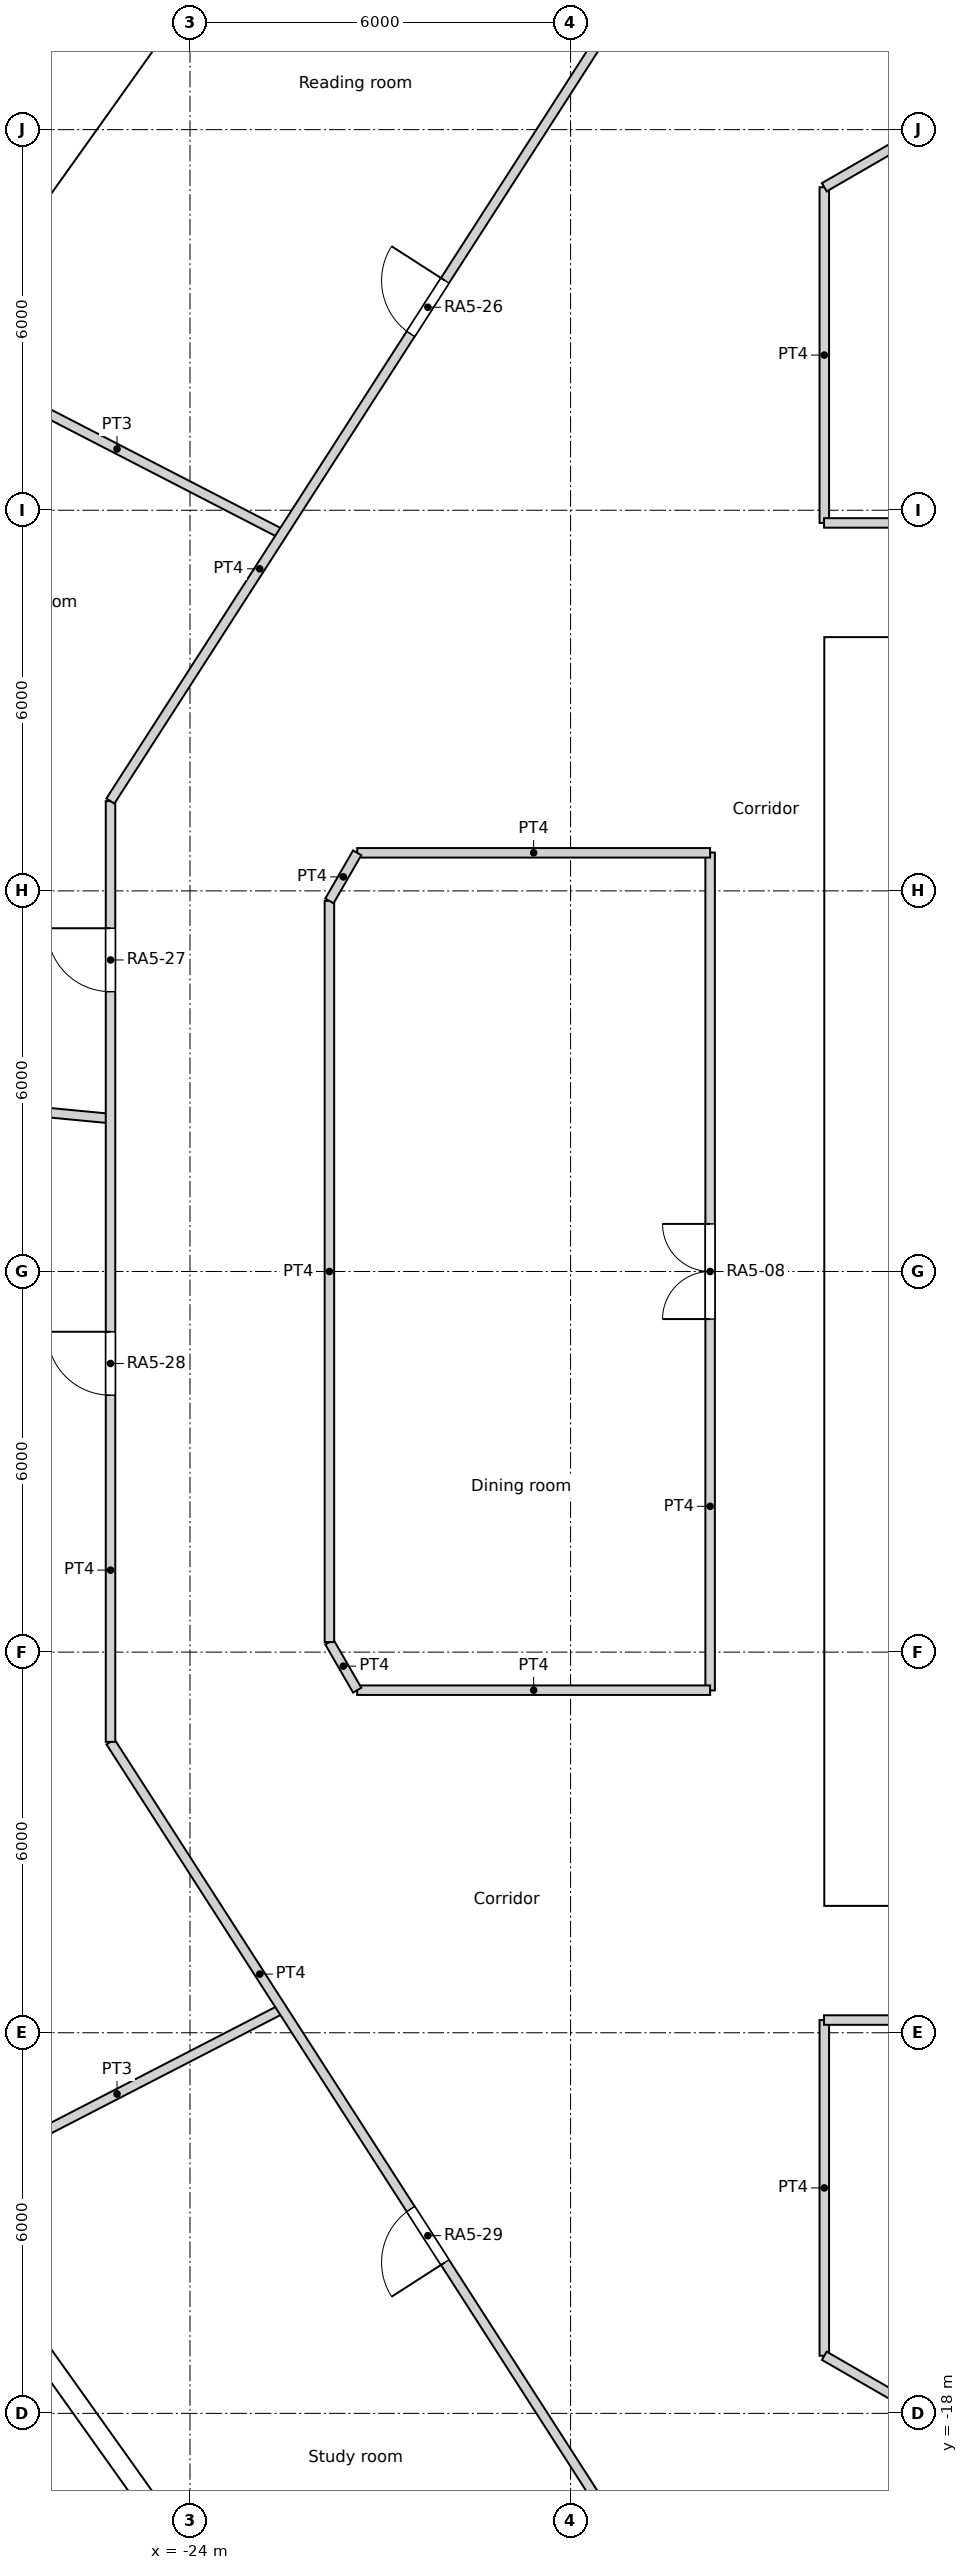
"""IFC4 building model, lengths in metres.
Left out: names, types, materials, properties, quantities, classifications, styles, units other than length and angle.
Written with IfcOpenShell. Run it as: python <this file> out.ifc"""

import sys

from ifc_helpers import new_model, si_unit, direction, frame, frame_2d, origin, origin_2d, place, context, subcontext, project, spatial, rectangle, circle, extrude, element, fill, save


model = new_model("IFC4")
c1 = context("Model", 3, precision=1e-05, world=origin(), true_north=direction((0.0, 1.0)))
c2 = subcontext(c1, "Body", "Model", "MODEL_VIEW")
j1 = project(units=[si_unit("LENGTHUNIT", "METRE"), si_unit("PLANEANGLEUNIT", "RADIAN")], contexts=[c1])
p1 = place(None, origin())
s1 = spatial("IfcSite", under=j1, at=p1, CompositionType="ELEMENT")
p2 = place(p1, origin())
s2 = spatial("IfcBuilding", under=s1, at=p2, CompositionType="ELEMENT")
p3 = place(p2, frame((0.0, 0.0, 71.4)))
s3 = spatial("IfcBuildingStorey", under=s2, at=p3, CompositionType="ELEMENT", Elevation=71.4)
for number, where, z_axis, x_axis in (
    (1, (-23.797, 18.715, 0.0), (0.0, 0.0, 1.0), (1.0, 0.0, 0.0)),
    (2, (-23.797, -18.715, 0.0), (0.0, 0.0, 1.0), (1.0, 0.0, 0.0)),
):
    element("IfcColumn", number, at=place(p3, frame(where, z_axis=z_axis, x_axis=x_axis)), inside=s3, PredefinedType="COLUMN", context=c2, shape_type="SweptSolid", body=[
        extrude(circle(Radius=0.6, at=origin_2d()), origin(), (0.0, 0.0, 1.0), 3.6),
    ])
for number, where, z_axis, x_axis in (
    (3, (-16.846, 17.855, 0.0), (0.0, 0.0, 1.0), (1.0, 0.0, 0.0)),
    (4, (-20.509, 13.489, 0.0), (0.0, 0.0, 1.0), (1.0, 0.0, 0.0)),
    (5, (-23.067, 8.396, 0.0), (0.0, 0.0, 1.0), (1.0, 0.0, 0.0)),
    (6, (-24.382, 2.85, 0.0), (0.0, 0.0, 1.0), (1.0, 0.0, 0.0)),
    (7, (-24.382, -2.85, 0.0), (0.0, 0.0, 1.0), (1.0, 0.0, 0.0)),
    (8, (-23.067, -8.396, 0.0), (0.0, 0.0, 1.0), (1.0, 0.0, 0.0)),
    (9, (-20.509, -13.489, 0.0), (0.0, 0.0, 1.0), (1.0, 0.0, 0.0)),
    (10, (-16.846, -17.855, 0.0), (0.0, 0.0, 1.0), (1.0, 0.0, 0.0)),
):
    element("IfcColumn", number, at=place(p3, frame(where, z_axis=z_axis, x_axis=x_axis)), inside=s3, PredefinedType="COLUMN", context=c2, shape_type="SweptSolid", body=[
        extrude(circle(Radius=0.65, at=origin_2d()), origin(), (0.0, 0.0, 1.0), 3.6),
    ])
for number, where, z_axis, x_axis in (
    (11, (-13.798, 12.802, 0.0), (0.0, 0.0, 1.0), (1.0, 0.0, 0.0)),
    (12, (-16.958, 8.167, 0.0), (0.0, 0.0, 1.0), (1.0, 0.0, 0.0)),
    (13, (-18.612, 2.805, 0.0), (0.0, 0.0, 1.0), (1.0, 0.0, 0.0)),
    (14, (-18.612, -2.805, 0.0), (0.0, 0.0, 1.0), (1.0, 0.0, 0.0)),
    (15, (-16.958, -8.167, 0.0), (0.0, 0.0, 1.0), (1.0, 0.0, 0.0)),
    (16, (-13.798, -12.802, 0.0), (0.0, 0.0, 1.0), (1.0, 0.0, 0.0)),
):
    element("IfcColumn", number, at=place(p3, frame(where, z_axis=z_axis, x_axis=x_axis)), inside=s3, PredefinedType="COLUMN", context=c2, shape_type="SweptSolid", body=[
        extrude(circle(Radius=0.7, at=origin_2d()), origin(), (0.0, 0.0, 1.0), 3.6),
    ])
p4 = place(p3, frame((-25.126, 19.734, -0.45), z_axis=(0.0, 0.0, 1.0), x_axis=(-0.580090570606, -0.814551981088, 0.0)))
e17 = element("IfcWall", 17, at=p4, inside=s3, PredefinedType="ELEMENTEDWALL", context=c2, shape_type="SweptSolid", body=[
    extrude(rectangle(XDim=3.0, YDim=1.45, at=frame_2d((1.5, 0.0))), origin(), (0.0, 0.0, 1.0), 3.6),
])
p5 = place(p4, frame((1.5, 0.0, 2.0)))
e18 = element("IfcOpeningElement", 18, at=p5, cuts=e17, PredefinedType="OPENING", context=c2, shape_type="SweptSolid", body=[
    extrude(circle(Radius=0.9, at=origin_2d()), frame((0.0, 0.735, 0.0), z_axis=(0.0, -1.0, 0.0), x_axis=(1.0, 0.0, 0.0)), (0.0, 0.0, 1.0), 1.47),
])
p6 = place(p3, frame((-26.39, -16.967, 0.0), z_axis=(0.0, 0.0, 1.0), x_axis=(0.580113774115, -0.814535456, 0.0)))
e19 = element("IfcWall", 19, at=p6, inside=s3, PredefinedType="SOLIDWALL", context=c2, shape_type="SweptSolid", body=[
    extrude(rectangle(XDim=2.98, YDim=0.3, at=frame_2d((1.49, 0.0))), origin(), (0.0, 0.0, 1.0), 3.15),
])
p7 = place(p6, frame((1.49, 0.0, 1.55)))
e20 = element("IfcOpeningElement", 20, at=p7, cuts=e19, PredefinedType="OPENING", context=c2, shape_type="SweptSolid", body=[
    extrude(circle(Radius=0.9, at=origin_2d()), frame((0.0, 0.16, 0.0), z_axis=(0.0, -1.0, 0.0), x_axis=(1.0, 0.0, 0.0)), (0.0, 0.0, 1.0), 0.32),
])
p8 = place(p3, frame((-14.0, -9.4, 0.0), z_axis=(0.0, 0.0, 1.0), x_axis=(1.0, 0.0, 0.0)))
e21 = element("IfcWall", 21, at=p8, inside=s3, PredefinedType="SOLIDWALL", context=c2, shape_type="SweptSolid", body=[
    extrude(rectangle(XDim=28.0, YDim=1.2, at=frame_2d((14.0, 0.0))), origin(), (0.0, 0.0, 1.0), 3.6),
])
p9 = place(p8, frame((14.9, 0.0, 0.0)))
e22 = element("IfcOpeningElement", 22, at=p9, cuts=e21, PredefinedType="OPENING", context=c2, shape_type="SweptSolid", body=[
    extrude(rectangle(XDim=1.0, YDim=2.1, at=frame_2d((0.5, 1.05))), frame((0.0, 0.6, 0.0), z_axis=(0.0, -1.0, 0.0), x_axis=(1.0, 0.0, 0.0)), (0.0, 0.0, 1.0), 1.2),
])
p10 = place(p8, frame((9.8, 0.0, 0.0)))
e23 = element("IfcOpeningElement", 23, at=p10, cuts=e21, PredefinedType="OPENING", context=c2, shape_type="SweptSolid", body=[
    extrude(rectangle(XDim=1.8, YDim=2.1, at=frame_2d((0.9, 1.05))), frame((0.0, 0.6, 0.0), z_axis=(0.0, -1.0, 0.0), x_axis=(1.0, 0.0, 0.0)), (0.0, 0.0, 1.0), 1.2),
])
p11 = place(p8, frame((16.4, 0.0, 0.0)))
e24 = element("IfcOpeningElement", 24, at=p11, cuts=e21, PredefinedType="OPENING", context=c2, shape_type="SweptSolid", body=[
    extrude(rectangle(XDim=1.8, YDim=2.1, at=frame_2d((0.9, 1.05))), frame((0.0, 0.6, 0.0), z_axis=(0.0, -1.0, 0.0), x_axis=(1.0, 0.0, 0.0)), (0.0, 0.0, 1.0), 1.2),
])
p12 = place(p3, frame((-14.0, 9.4, 0.0), z_axis=(0.0, 0.0, 1.0), x_axis=(1.0, 0.0, 0.0)))
e25 = element("IfcWall", 25, at=p12, inside=s3, PredefinedType="SOLIDWALL", context=c2, shape_type="SweptSolid", body=[
    extrude(rectangle(XDim=28.0, YDim=1.2, at=frame_2d((14.0, 0.0))), origin(), (0.0, 0.0, 1.0), 3.6),
])
p13 = place(p12, frame((9.8, 0.0, 0.0)))
e26 = element("IfcOpeningElement", 26, at=p13, cuts=e25, PredefinedType="OPENING", context=c2, shape_type="SweptSolid", body=[
    extrude(rectangle(XDim=1.8, YDim=2.1, at=frame_2d((0.9, 1.05))), frame((0.0, 0.6, 0.0), z_axis=(0.0, -1.0, 0.0), x_axis=(1.0, 0.0, 0.0)), (0.0, 0.0, 1.0), 1.2),
])
p14 = place(p3, frame((-13.4, -8.8, 0.0), z_axis=(0.0, 0.0, 1.0), x_axis=(0.0, 1.0, 0.0)))
e27 = element("IfcWall", 27, at=p14, inside=s3, PredefinedType="SOLIDWALL", context=c2, shape_type="SweptSolid", body=[
    extrude(rectangle(XDim=17.6, YDim=1.2, at=frame_2d((8.8, 0.0))), origin(), (0.0, 0.0, 1.0), 3.6),
])
p15 = place(p14, frame((5.2, 0.0, 0.0)))
e28 = element("IfcOpeningElement", 28, at=p15, cuts=e27, PredefinedType="OPENING", context=c2, shape_type="SweptSolid", body=[
    extrude(rectangle(XDim=1.0, YDim=2.1, at=frame_2d((0.5, 1.05))), frame((0.0, 0.6, 0.0), z_axis=(0.0, -1.0, 0.0), x_axis=(1.0, 0.0, 0.0)), (0.0, 0.0, 1.0), 1.2),
])
p16 = place(p14, frame((11.4, 0.0, 0.0)))
e29 = element("IfcOpeningElement", 29, at=p16, cuts=e27, PredefinedType="OPENING", context=c2, shape_type="SweptSolid", body=[
    extrude(rectangle(XDim=1.0, YDim=2.1, at=frame_2d((0.5, 1.05))), frame((0.0, 0.6, 0.0), z_axis=(0.0, -1.0, 0.0), x_axis=(1.0, 0.0, 0.0)), (0.0, 0.0, 1.0), 1.2),
])
p17 = place(p3, frame((-14.004, 11.8, 0.0), z_axis=(0.0, 0.0, 1.0), x_axis=(1.0, 0.0, 0.0)))
e30 = element("IfcWall", 30, at=p17, inside=s3, PredefinedType="PARTITIONING", context=c2, shape_type="SweptSolid", body=[
    extrude(rectangle(XDim=12.816, YDim=0.15, at=frame_2d((6.408, 0.0))), origin(), (0.0, 0.0, 1.0), 3.15),
])
p18 = place(p17, frame((5.908, 0.0, 0.0)))
e31 = element("IfcOpeningElement", 31, at=p18, cuts=e30, PredefinedType="OPENING", context=c2, shape_type="SweptSolid", body=[
    extrude(rectangle(XDim=1.0, YDim=2.04, at=frame_2d((0.5, 1.02))), frame((0.0, 0.075, 0.0), z_axis=(0.0, -1.0, 0.0), x_axis=(1.0, 0.0, 0.0)), (0.0, 0.0, 1.0), 0.15),
])
p19 = place(p3, frame((-14.004, -11.8, 0.0), z_axis=(0.0, 0.0, 1.0), x_axis=(1.0, 0.0, 0.0)))
e32 = element("IfcWall", 32, at=p19, inside=s3, PredefinedType="PARTITIONING", context=c2, shape_type="SweptSolid", body=[
    extrude(rectangle(XDim=12.816, YDim=0.15, at=frame_2d((6.408, 0.0))), origin(), (0.0, 0.0, 1.0), 3.15),
])
p20 = place(p19, frame((5.908, 0.0, 0.0)))
e33 = element("IfcOpeningElement", 33, at=p20, cuts=e32, PredefinedType="OPENING", context=c2, shape_type="SweptSolid", body=[
    extrude(rectangle(XDim=1.0, YDim=2.04, at=frame_2d((0.5, 1.02))), frame((0.0, 0.075, 0.0), z_axis=(0.0, -1.0, 0.0), x_axis=(1.0, 0.0, 0.0)), (0.0, 0.0, 1.0), 0.15),
])
p21 = place(p3, frame((-15.8, -6.604, 0.0), z_axis=(0.0, 0.0, 1.0), x_axis=(0.0, 1.0, 0.0)))
e34 = element("IfcWall", 34, at=p21, inside=s3, PredefinedType="PARTITIONING", context=c2, shape_type="SweptSolid", body=[
    extrude(rectangle(XDim=13.208, YDim=0.15, at=frame_2d((6.604, 0.0))), origin(), (0.0, 0.0, 1.0), 3.15),
])
p22 = place(p21, frame((5.854, 0.0, 0.0)))
e35 = element("IfcOpeningElement", 35, at=p22, cuts=e34, PredefinedType="OPENING", context=c2, shape_type="SweptSolid", body=[
    extrude(rectangle(XDim=1.5, YDim=2.1, at=frame_2d((0.75, 1.05))), frame((0.0, 0.075, 0.0), z_axis=(0.0, -1.0, 0.0), x_axis=(1.0, 0.0, 0.0)), (0.0, 0.0, 1.0), 0.15),
])
p23 = place(p3, frame((-14.0, 17.092, 0.0), z_axis=(0.0, 0.0, 1.0), x_axis=(0.86602719091, 0.499996904595, 0.0)))
e36 = element("IfcWall", 36, at=p23, inside=s3, PredefinedType="PARTITIONING", context=c2, shape_type="SweptSolid", body=[
    extrude(rectangle(XDim=9.42, YDim=0.15, at=frame_2d((4.71, 0.0))), origin(), (0.0, 0.0, 1.0), 3.15),
])
p24 = place(p3, frame((-14.0, 11.8, 0.0), z_axis=(0.0, 0.0, 1.0), x_axis=(0.0, 1.0, 0.0)))
e37 = element("IfcWall", 37, at=p24, inside=s3, PredefinedType="PARTITIONING", context=c2, shape_type="SweptSolid", body=[
    extrude(rectangle(XDim=5.292, YDim=0.15, at=frame_2d((2.646, 0.0))), origin(), (0.0, 0.0, 1.0), 3.15),
])
p25 = place(p3, frame((-25.255, 7.416, 0.0), z_axis=(0.0, 0.0, 1.0), x_axis=(0.540805851332, 0.841147449123, 0.0)))
e38 = element("IfcWall", 38, at=p25, inside=s3, PredefinedType="PARTITIONING", context=c2, shape_type="SweptSolid", body=[
    extrude(rectangle(XDim=14.829, YDim=0.15, at=frame_2d((7.415, 0.0))), origin(), (0.0, 0.0, 1.0), 3.15),
])
p26 = place(p25, frame((8.754, 0.0, 0.0)))
e39 = element("IfcOpeningElement", 39, at=p26, cuts=e38, PredefinedType="OPENING", context=c2, shape_type="SweptSolid", body=[
    extrude(rectangle(XDim=1.0, YDim=2.04, at=frame_2d((0.5, 1.02))), frame((0.0, 0.075, 0.0), z_axis=(0.0, -1.0, 0.0), x_axis=(1.0, 0.0, 0.0)), (0.0, 0.0, 1.0), 0.15),
])
p27 = place(p3, frame((-14.0, -17.092, 0.0), z_axis=(0.0, 0.0, 1.0), x_axis=(0.0, 1.0, 0.0)))
e40 = element("IfcWall", 40, at=p27, inside=s3, PredefinedType="PARTITIONING", context=c2, shape_type="SweptSolid", body=[
    extrude(rectangle(XDim=5.292, YDim=0.15, at=frame_2d((2.646, 0.0))), origin(), (0.0, 0.0, 1.0), 3.15),
])
p28 = place(p3, frame((-21.364, 6.6, 0.0), z_axis=(0.0, 0.0, 1.0), x_axis=(1.0, 0.0, 0.0)))
e41 = element("IfcWall", 41, at=p28, inside=s3, PredefinedType="PARTITIONING", context=c2, shape_type="SweptSolid", body=[
    extrude(rectangle(XDim=5.564, YDim=0.15, at=frame_2d((2.782, 0.0))), origin(), (0.0, 0.0, 1.0), 3.15),
])
p29 = place(p3, frame((-21.802, 5.842, 0.0), z_axis=(0.0, 0.0, 1.0), x_axis=(0.500277597875, 0.865865073245, 0.0)))
e42 = element("IfcWall", 42, at=p29, inside=s3, PredefinedType="PARTITIONING", context=c2, shape_type="SweptSolid", body=[
    extrude(rectangle(XDim=0.875, YDim=0.15, at=frame_2d((0.438, 0.0))), origin(), (0.0, 0.0, 1.0), 3.15),
])
p30 = place(p3, frame((-21.802, -5.842, 0.0), z_axis=(0.0, 0.0, 1.0), x_axis=(0.0, 1.0, 0.0)))
e43 = element("IfcWall", 43, at=p30, inside=s3, PredefinedType="PARTITIONING", context=c2, shape_type="SweptSolid", body=[
    extrude(rectangle(XDim=11.684, YDim=0.15, at=frame_2d((5.842, 0.0))), origin(), (0.0, 0.0, 1.0), 3.15),
])
p31 = place(p3, frame((-21.802, -5.842, 0.0), z_axis=(0.0, 0.0, 1.0), x_axis=(0.500277597875, -0.865865073245, 0.0)))
e44 = element("IfcWall", 44, at=p31, inside=s3, PredefinedType="PARTITIONING", context=c2, shape_type="SweptSolid", body=[
    extrude(rectangle(XDim=0.875, YDim=0.15, at=frame_2d((0.438, 0.0))), origin(), (0.0, 0.0, 1.0), 3.15),
])
p32 = place(p3, frame((-21.364, -6.6, 0.0), z_axis=(0.0, 0.0, 1.0), x_axis=(1.0, 0.0, 0.0)))
e45 = element("IfcWall", 45, at=p32, inside=s3, PredefinedType="PARTITIONING", context=c2, shape_type="SweptSolid", body=[
    extrude(rectangle(XDim=5.564, YDim=0.15, at=frame_2d((2.782, 0.0))), origin(), (0.0, 0.0, 1.0), 3.15),
])
p33 = place(p3, frame((-25.253, -7.415, 0.0), z_axis=(0.0, 0.0, 1.0), x_axis=(0.0, 1.0, 0.0)))
e46 = element("IfcWall", 46, at=p33, inside=s3, PredefinedType="PARTITIONING", context=c2, shape_type="SweptSolid", body=[
    extrude(rectangle(XDim=14.83, YDim=0.15, at=frame_2d((7.415, 0.0))), origin(), (0.0, 0.0, 1.0), 3.15),
])
p34 = place(p33, frame((11.826, 0.0, 0.0)))
e47 = element("IfcOpeningElement", 47, at=p34, cuts=e46, PredefinedType="OPENING", context=c2, shape_type="SweptSolid", body=[
    extrude(rectangle(XDim=1.0, YDim=2.04, at=frame_2d((0.5, 1.02))), frame((0.0, 0.075, 0.0), z_axis=(0.0, -1.0, 0.0), x_axis=(1.0, 0.0, 0.0)), (0.0, 0.0, 1.0), 0.15),
])
p35 = place(p33, frame((5.465, 0.0, 0.0)))
e48 = element("IfcOpeningElement", 48, at=p35, cuts=e46, PredefinedType="OPENING", context=c2, shape_type="SweptSolid", body=[
    extrude(rectangle(XDim=1.0, YDim=2.04, at=frame_2d((0.5, 1.02))), frame((0.0, 0.075, 0.0), z_axis=(0.0, -1.0, 0.0), x_axis=(1.0, 0.0, 0.0)), (0.0, 0.0, 1.0), 0.15),
])
p36 = place(p3, frame((-25.253, -7.415, 0.0), z_axis=(0.0, 0.0, 1.0), x_axis=(0.540656073354, -0.841243728265, 0.0)))
e49 = element("IfcWall", 49, at=p36, inside=s3, PredefinedType="PARTITIONING", context=c2, shape_type="SweptSolid", body=[
    extrude(rectangle(XDim=14.829, YDim=0.15, at=frame_2d((7.415, 0.0))), origin(), (0.0, 0.0, 1.0), 3.15),
])
p37 = place(p36, frame((8.753, 0.0, 0.0)))
e50 = element("IfcOpeningElement", 50, at=p37, cuts=e49, PredefinedType="OPENING", context=c2, shape_type="SweptSolid", body=[
    extrude(rectangle(XDim=1.0, YDim=2.04, at=frame_2d((0.5, 1.02))), frame((0.0, 0.075, 0.0), z_axis=(0.0, -1.0, 0.0), x_axis=(1.0, 0.0, 0.0)), (0.0, 0.0, 1.0), 0.15),
])
p38 = place(p3, frame((-14.0, -17.092, 0.0), z_axis=(0.0, 0.0, 1.0), x_axis=(0.86602719091, -0.499996904595, 0.0)))
e51 = element("IfcWall", 51, at=p38, inside=s3, PredefinedType="PARTITIONING", context=c2, shape_type="SweptSolid", body=[
    extrude(rectangle(XDim=9.42, YDim=0.15, at=frame_2d((4.71, 0.0))), origin(), (0.0, 0.0, 1.0), 3.15),
])
p39 = place(p3, frame((-27.753, 14.308, 0.0), z_axis=(0.0, 0.0, 1.0), x_axis=(0.88877955153, -0.45833493079, 0.0)))
e52 = element("IfcWall", 52, at=p39, inside=s3, PredefinedType="PARTITIONING", context=c2, shape_type="SweptSolid", body=[
    extrude(rectangle(XDim=5.856, YDim=0.15, at=frame_2d((2.928, 0.0))), origin(), (0.0, 0.0, 1.0), 3.15),
])
p40 = place(p3, frame((-31.083, 2.968, 0.0), z_axis=(0.0, 0.0, 1.0), x_axis=(0.995465070325, -0.095127775983, 0.0)))
e53 = element("IfcWall", 53, at=p40, inside=s3, PredefinedType="PARTITIONING", context=c2, shape_type="SweptSolid", body=[
    extrude(rectangle(XDim=5.857, YDim=0.15, at=frame_2d((2.928, 0.0))), origin(), (0.0, 0.0, 1.0), 3.15),
])
p41 = place(p3, frame((-27.753, -14.308, 0.0), z_axis=(0.0, 0.0, 1.0), x_axis=(0.88877955153, 0.45833493079, 0.0)))
e54 = element("IfcWall", 54, at=p41, inside=s3, PredefinedType="PARTITIONING", context=c2, shape_type="SweptSolid", body=[
    extrude(rectangle(XDim=5.856, YDim=0.15, at=frame_2d((2.928, 0.0))), origin(), (0.0, 0.0, 1.0), 3.15),
])
p42 = place(p5, origin())
e55 = element("IfcWindow", 55, at=p42, inside=s3, PartitioningType="SINGLE_PANEL", PredefinedType="WINDOW", context=c2, shape_type="SweptSolid", body=[
    extrude(circle(Radius=0.9, at=origin_2d()), frame((0.0, 0.695, 0.0), z_axis=(0.0, -1.0, 0.0), x_axis=(1.0, 0.0, 0.0)), (0.0, 0.0, 1.0), 0.1),
])
fill(e18, e55)
p43 = place(p7, origin())
e56 = element("IfcWindow", 56, at=p43, inside=s3, PartitioningType="SINGLE_PANEL", PredefinedType="WINDOW", context=c2, shape_type="SweptSolid", body=[
    extrude(circle(Radius=0.9, at=origin_2d()), frame((0.0, 0.12, 0.0), z_axis=(0.0, -1.0, 0.0), x_axis=(1.0, 0.0, 0.0)), (0.0, 0.0, 1.0), 0.1),
])
fill(e20, e56)
p44 = place(p15, origin())
e57 = element("IfcDoor", 57, at=p44, inside=s3, OperationType="DOUBLE_DOOR_SINGLE_SWING", PredefinedType="DOOR", context=c2, shape_type="SweptSolid", body=[
    extrude(rectangle(XDim=1.0, YDim=2.1, at=frame_2d((0.5, 1.05))), frame((0.0, 0.025, 0.0), z_axis=(0.0, -1.0, 0.0), x_axis=(1.0, 0.0, 0.0)), (0.0, 0.0, 1.0), 0.05),
])
fill(e28, e57)
p45 = place(p16, origin())
e58 = element("IfcDoor", 58, at=p45, inside=s3, OperationType="DOUBLE_DOOR_SINGLE_SWING", PredefinedType="DOOR", context=c2, shape_type="SweptSolid", body=[
    extrude(rectangle(XDim=1.0, YDim=2.1, at=frame_2d((0.5, 1.05))), frame((0.0, 0.025, 0.0), z_axis=(0.0, -1.0, 0.0), x_axis=(1.0, 0.0, 0.0)), (0.0, 0.0, 1.0), 0.05),
])
fill(e29, e58)
p46 = place(p22, origin())
e59 = element("IfcDoor", 59, at=p46, inside=s3, OperationType="DOUBLE_DOOR_SINGLE_SWING", PredefinedType="DOOR", context=c2, shape_type="SweptSolid", body=[
    extrude(rectangle(XDim=1.5, YDim=2.1, at=frame_2d((0.75, 1.05))), frame((0.0, 0.025, 0.0), z_axis=(0.0, -1.0, 0.0), x_axis=(1.0, 0.0, 0.0)), (0.0, 0.0, 1.0), 0.05),
])
fill(e35, e59)
p47 = place(p26, origin())
e60 = element("IfcDoor", 60, at=p47, inside=s3, OperationType="SINGLE_SWING_RIGHT", PredefinedType="DOOR", context=c2, shape_type="SweptSolid", body=[
    extrude(rectangle(XDim=1.0, YDim=2.04, at=frame_2d((0.5, 1.02))), frame((0.0, 0.025, 0.0), z_axis=(0.0, -1.0, 0.0), x_axis=(1.0, 0.0, 0.0)), (0.0, 0.0, 1.0), 0.05),
])
fill(e39, e60)
p48 = place(p34, origin())
e61 = element("IfcDoor", 61, at=p48, inside=s3, OperationType="SINGLE_SWING_RIGHT", PredefinedType="DOOR", context=c2, shape_type="SweptSolid", body=[
    extrude(rectangle(XDim=1.0, YDim=2.04, at=frame_2d((0.5, 1.02))), frame((0.0, 0.025, 0.0), z_axis=(0.0, -1.0, 0.0), x_axis=(1.0, 0.0, 0.0)), (0.0, 0.0, 1.0), 0.05),
])
fill(e47, e61)
p49 = place(p35, origin())
e62 = element("IfcDoor", 62, at=p49, inside=s3, OperationType="SINGLE_SWING_RIGHT", PredefinedType="DOOR", context=c2, shape_type="SweptSolid", body=[
    extrude(rectangle(XDim=1.0, YDim=2.04, at=frame_2d((0.5, 1.02))), frame((0.0, 0.025, 0.0), z_axis=(0.0, -1.0, 0.0), x_axis=(1.0, 0.0, 0.0)), (0.0, 0.0, 1.0), 0.05),
])
fill(e48, e62)
p50 = place(p37, origin())
e63 = element("IfcDoor", 63, at=p50, inside=s3, OperationType="SINGLE_SWING_LEFT", PredefinedType="DOOR", context=c2, shape_type="SweptSolid", body=[
    extrude(rectangle(XDim=1.0, YDim=2.04, at=frame_2d((0.5, 1.02))), frame((0.0, 0.025, 0.0), z_axis=(0.0, -1.0, 0.0), x_axis=(1.0, 0.0, 0.0)), (0.0, 0.0, 1.0), 0.05),
])
fill(e50, e63)
save(model, sys.argv[1])
